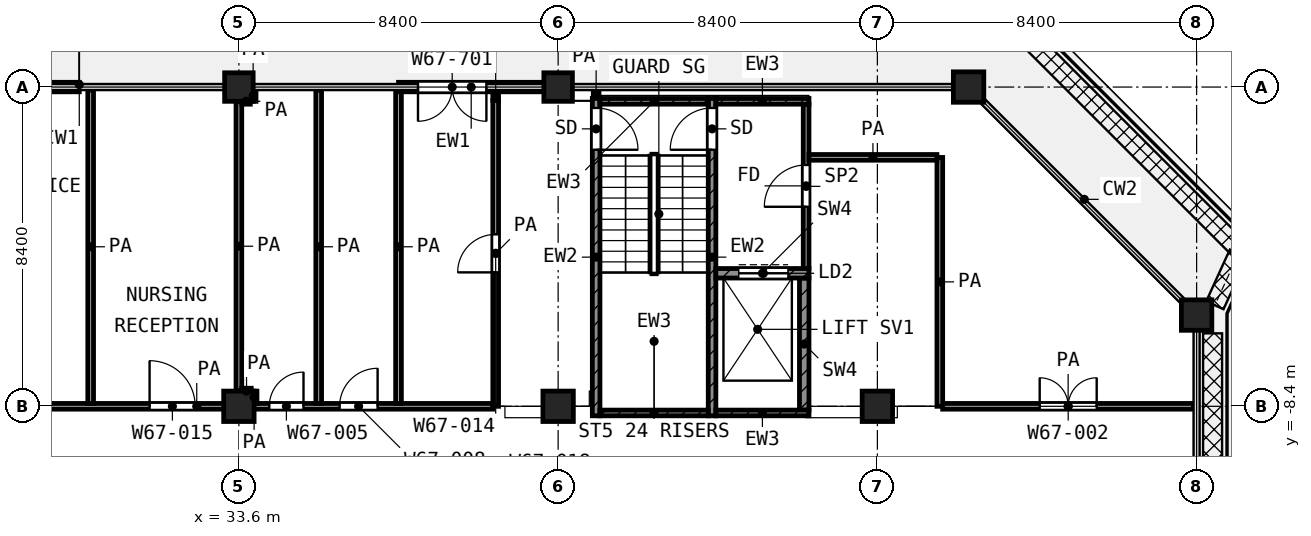
"""IFC4 building model, lengths in metres.
Left out: names, types, materials, properties, quantities, classifications, styles, units other than length and angle.
Written with IfcOpenShell. Run it as: python <this file> out.ifc"""

import sys

from ifc_helpers import new_model, si_unit, direction, frame, frame_2d, origin, origin_2d, place, context, subcontext, project, spatial, rectangle, extrude, element, fill, save


model = new_model("IFC4")
c1 = context("Model", 3, precision=1e-05, world=origin(), true_north=direction((0.0, 1.0)))
c2 = subcontext(c1, "Body", "Model", "MODEL_VIEW")
j1 = project(units=[si_unit("LENGTHUNIT", "METRE"), si_unit("PLANEANGLEUNIT", "RADIAN")], contexts=[c1])
p1 = place(None, origin())
s1 = spatial("IfcSite", under=j1, at=p1, CompositionType="ELEMENT")
p2 = place(p1, origin())
s2 = spatial("IfcBuilding", under=s1, at=p2, CompositionType="ELEMENT")
p3 = place(p2, frame((0.0, 0.0, 311.2)))
s3 = spatial("IfcBuildingStorey", under=s2, at=p3, CompositionType="ELEMENT", Elevation=311.2)
for number, where, z_axis, x_axis in (
    (1, (33.6, 0.0, 0.0), (0.0, 0.0, 1.0), (1.0, 0.0, 0.0)),
    (2, (42.0, 0.0, 0.0), (0.0, 0.0, 1.0), (1.0, 0.0, 0.0)),
):
    element("IfcColumn", number, at=place(p3, frame(where, z_axis=z_axis, x_axis=x_axis)), inside=s3, PredefinedType="COLUMN", context=c2, shape_type="SweptSolid", body=[
        extrude(rectangle(XDim=0.75, YDim=0.75, at=origin_2d()), origin(), (0.0, 0.0, 1.0), 4.2),
    ])
for number, where, z_axis, x_axis in (
    (3, (52.8, 0.0, 0.0), (0.0, 0.0, 1.0), (1.0, 0.0, 0.0)),
    (4, (58.8, -6.0, 0.0), (0.0, 0.0, 1.0), (1.0, 0.0, 0.0)),
    (5, (33.6, -8.4, 0.0), (0.0, 0.0, 1.0), (1.0, 0.0, 0.0)),
    (6, (42.0, -8.4, 0.0), (0.0, 0.0, 1.0), (1.0, 0.0, 0.0)),
    (7, (50.4, -8.4, 0.0), (0.0, 0.0, 1.0), (1.0, 0.0, 0.0)),
):
    element("IfcColumn", number, at=place(p3, frame(where, z_axis=z_axis, x_axis=x_axis)), inside=s3, PredefinedType="COLUMN", context=c2, shape_type="SweptSolid", body=[
        extrude(rectangle(XDim=0.8, YDim=0.8, at=origin_2d()), origin(), (0.0, 0.0, 1.0), 4.2),
    ])
p4 = place(p3, frame((41.625, 0.0, 0.0), z_axis=(0.0, 0.0, 1.0), x_axis=(-1.0, 0.0, 0.0)))
e8 = element("IfcWall", 8, at=p4, inside=s3, PredefinedType="SOLIDWALL", context=c2, shape_type="SweptSolid", body=[
    extrude(rectangle(XDim=3.825, YDim=0.25, at=frame_2d((1.913, 0.0))), origin(), (0.0, 0.0, 1.0), 3.48),
])
p5 = place(p4, frame((1.512, 0.0, 0.0)))
e9 = element("IfcOpeningElement", 9, at=p5, cuts=e8, PredefinedType="OPENING", context=c2, shape_type="SweptSolid", body=[
    extrude(rectangle(XDim=1.8, YDim=2.1, at=frame_2d((0.9, 1.05))), frame((0.0, 0.135, 0.0), z_axis=(0.0, -1.0, 0.0), x_axis=(1.0, 0.0, 0.0)), (0.0, 0.0, 1.0), 0.27),
])
p6 = place(p3, frame((29.4, 0.0, 0.0), z_axis=(0.0, 0.0, 1.0), x_axis=(-1.0, 0.0, 0.0)))
e10 = element("IfcWall", 10, at=p6, inside=s3, PredefinedType="SOLIDWALL", context=c2, shape_type="SweptSolid", body=[
    extrude(rectangle(XDim=3.825, YDim=0.25, at=frame_2d((1.913, 0.0))), origin(), (0.0, 0.0, 1.0), 3.48),
])
p7 = place(p6, frame((1.012, 0.0, 0.0)))
e11 = element("IfcOpeningElement", 11, at=p7, cuts=e10, PredefinedType="OPENING", context=c2, shape_type="SweptSolid", body=[
    extrude(rectangle(XDim=1.8, YDim=2.1, at=frame_2d((0.9, 1.05))), frame((0.0, 0.135, 0.0), z_axis=(0.0, -1.0, 0.0), x_axis=(1.0, 0.0, 0.0)), (0.0, 0.0, 1.0), 0.27),
])
p8 = place(p3, frame((43.0, -8.65, 0.0), z_axis=(0.0, 0.0, 1.0), x_axis=(0.0, 1.0, 0.0)))
e12 = element("IfcWall", 12, at=p8, inside=s3, PredefinedType="SHEAR", context=c2, shape_type="SweptSolid", body=[
    extrude(rectangle(XDim=8.35, YDim=0.2, at=frame_2d((4.175, 0.0))), origin(), (0.0, 0.0, 1.0), 3.6),
])
p9 = place(p8, frame((7.0, 0.0, 0.0)))
e13 = element("IfcOpeningElement", 13, at=p9, cuts=e12, PredefinedType="OPENING", context=c2, shape_type="SweptSolid", body=[
    extrude(rectangle(XDim=1.1, YDim=2.1, at=frame_2d((0.55, 1.05))), frame((0.0, 0.11, 0.0), z_axis=(0.0, -1.0, 0.0), x_axis=(1.0, 0.0, 0.0)), (0.0, 0.0, 1.0), 0.22),
])
p10 = place(p3, frame((46.05, -8.65, 0.0), z_axis=(0.0, 0.0, 1.0), x_axis=(0.0, 1.0, 0.0)))
e14 = element("IfcWall", 14, at=p10, inside=s3, PredefinedType="SHEAR", context=c2, shape_type="SweptSolid", body=[
    extrude(rectangle(XDim=8.35, YDim=0.2, at=frame_2d((4.175, 0.0))), origin(), (0.0, 0.0, 1.0), 3.6),
])
p11 = place(p10, frame((7.0, 0.0, 0.0)))
e15 = element("IfcOpeningElement", 15, at=p11, cuts=e14, PredefinedType="OPENING", context=c2, shape_type="SweptSolid", body=[
    extrude(rectangle(XDim=1.1, YDim=2.1, at=frame_2d((0.55, 1.05))), frame((0.0, 0.11, 0.0), z_axis=(0.0, -1.0, 0.0), x_axis=(1.0, 0.0, 0.0)), (0.0, 0.0, 1.0), 0.22),
])
p12 = place(p3, frame((43.1, -0.375, 0.0), z_axis=(0.0, 0.0, 1.0), x_axis=(1.0, 0.0, 0.0)))
e16 = element("IfcWall", 16, at=p12, inside=s3, PredefinedType="SHEAR", context=c2, shape_type="SweptSolid", body=[
    extrude(rectangle(XDim=2.85, YDim=0.15, at=frame_2d((1.425, 0.0))), origin(), (0.0, 0.0, 1.0), 3.6),
])
p13 = place(p3, frame((46.15, -0.375, 0.0), z_axis=(0.0, 0.0, 1.0), x_axis=(1.0, 0.0, 0.0)))
e17 = element("IfcWall", 17, at=p13, inside=s3, PredefinedType="SHEAR", context=c2, shape_type="SweptSolid", body=[
    extrude(rectangle(XDim=2.45, YDim=0.15, at=frame_2d((1.225, 0.0))), origin(), (0.0, 0.0, 1.0), 3.6),
])
p14 = place(p3, frame((43.1, -8.575, 0.0), z_axis=(0.0, 0.0, 1.0), x_axis=(1.0, 0.0, 0.0)))
e18 = element("IfcWall", 18, at=p14, inside=s3, PredefinedType="SHEAR", context=c2, shape_type="SweptSolid", body=[
    extrude(rectangle(XDim=2.85, YDim=0.15, at=frame_2d((1.425, 0.0))), origin(), (0.0, 0.0, 1.0), 3.6),
])
p15 = place(p3, frame((46.15, -8.575, 0.0), z_axis=(0.0, 0.0, 1.0), x_axis=(1.0, 0.0, 0.0)))
e19 = element("IfcWall", 19, at=p15, inside=s3, PredefinedType="SHEAR", context=c2, shape_type="SweptSolid", body=[
    extrude(rectangle(XDim=2.45, YDim=0.15, at=frame_2d((1.225, 0.0))), origin(), (0.0, 0.0, 1.0), 3.6),
])
p16 = place(p3, frame((46.15, -4.9, 0.0), z_axis=(0.0, 0.0, 1.0), x_axis=(1.0, 0.0, 0.0)))
e20 = element("IfcWall", 20, at=p16, inside=s3, PredefinedType="SHEAR", context=c2, shape_type="SweptSolid", body=[
    extrude(rectangle(XDim=2.45, YDim=0.25, at=frame_2d((1.225, 0.0))), origin(), (0.0, 0.0, 1.0), 3.6),
])
p17 = place(p16, frame((0.6, 0.0, 0.0)))
e21 = element("IfcOpeningElement", 21, at=p17, cuts=e20, PredefinedType="OPENING", context=c2, shape_type="SweptSolid", body=[
    extrude(rectangle(XDim=1.3, YDim=2.1, at=frame_2d((0.65, 1.05))), frame((0.0, 0.135, 0.0), z_axis=(0.0, -1.0, 0.0), x_axis=(1.0, 0.0, 0.0)), (0.0, 0.0, 1.0), 0.27),
])
p18 = place(p3, frame((48.475, -8.5, 0.0), z_axis=(0.0, 0.0, 1.0), x_axis=(0.0, 1.0, 0.0)))
e22 = element("IfcWall", 22, at=p18, inside=s3, PredefinedType="SHEAR", context=c2, shape_type="SweptSolid", body=[
    extrude(rectangle(XDim=3.475, YDim=0.25, at=frame_2d((1.738, 0.0))), origin(), (0.0, 0.0, 1.0), 3.6),
])
p19 = place(p3, frame((48.525, -4.775, 0.0), z_axis=(0.0, 0.0, 1.0), x_axis=(0.0, 1.0, 0.0)))
e23 = element("IfcWall", 23, at=p19, inside=s3, PredefinedType="PARTITIONING", context=c2, shape_type="SweptSolid", body=[
    extrude(rectangle(XDim=4.325, YDim=0.15, at=frame_2d((2.163, 0.0))), origin(), (0.0, 0.0, 1.0), 3.6),
])
p20 = place(p19, frame((1.625, 0.0, 0.0)))
e24 = element("IfcOpeningElement", 24, at=p20, cuts=e23, PredefinedType="OPENING", context=c2, shape_type="SweptSolid", body=[
    extrude(rectangle(XDim=1.1, YDim=2.1, at=frame_2d((0.55, 1.05))), frame((0.0, 0.085, 0.0), z_axis=(0.0, -1.0, 0.0), x_axis=(1.0, 0.0, 0.0)), (0.0, 0.0, 1.0), 0.17),
])
p21 = place(p3, frame((24.7, -8.4, 0.0), z_axis=(0.0, 0.0, 1.0), x_axis=(1.0, 0.0, 0.0)))
e25 = element("IfcWall", 25, at=p21, inside=s3, PredefinedType="PARTITIONING", context=c2, shape_type="SweptSolid", body=[
    extrude(rectangle(XDim=15.582, YDim=0.15, at=frame_2d((7.791, 0.0))), origin(), (0.0, 0.0, 1.0), 3.6),
])
p22 = place(p21, frame((2.25, 0.0, 0.0)))
e26 = element("IfcOpeningElement", 26, at=p22, cuts=e25, PredefinedType="OPENING", context=c2, shape_type="SweptSolid", body=[
    extrude(rectangle(XDim=1.0, YDim=2.1, at=frame_2d((0.5, 1.05))), frame((0.0, 0.085, 0.0), z_axis=(0.0, -1.0, 0.0), x_axis=(1.0, 0.0, 0.0)), (0.0, 0.0, 1.0), 0.17),
])
p23 = place(p21, frame((6.55, 0.0, 0.0)))
e27 = element("IfcOpeningElement", 27, at=p23, cuts=e25, PredefinedType="OPENING", context=c2, shape_type="SweptSolid", body=[
    extrude(rectangle(XDim=1.2, YDim=2.1, at=frame_2d((0.6, 1.05))), frame((0.0, 0.085, 0.0), z_axis=(0.0, -1.0, 0.0), x_axis=(1.0, 0.0, 0.0)), (0.0, 0.0, 1.0), 0.17),
])
p24 = place(p21, frame((9.7, 0.0, 0.0)))
e28 = element("IfcOpeningElement", 28, at=p24, cuts=e25, PredefinedType="OPENING", context=c2, shape_type="SweptSolid", body=[
    extrude(rectangle(XDim=0.9, YDim=2.1, at=frame_2d((0.45, 1.05))), frame((0.0, 0.085, 0.0), z_axis=(0.0, -1.0, 0.0), x_axis=(1.0, 0.0, 0.0)), (0.0, 0.0, 1.0), 0.17),
])
p25 = place(p21, frame((11.55, 0.0, 0.0)))
e29 = element("IfcOpeningElement", 29, at=p25, cuts=e25, PredefinedType="OPENING", context=c2, shape_type="SweptSolid", body=[
    extrude(rectangle(XDim=1.0, YDim=2.1, at=frame_2d((0.5, 1.05))), frame((0.0, 0.085, 0.0), z_axis=(0.0, -1.0, 0.0), x_axis=(1.0, 0.0, 0.0)), (0.0, 0.0, 1.0), 0.17),
])
p26 = place(p3, frame((52.118, -8.4, 0.0), z_axis=(0.0, 0.0, 1.0), x_axis=(1.0, 0.0, 0.0)))
e30 = element("IfcWall", 30, at=p26, inside=s3, PredefinedType="PARTITIONING", context=c2, shape_type="SweptSolid", body=[
    extrude(rectangle(XDim=6.602, YDim=0.15, at=frame_2d((3.301, 0.0))), origin(), (0.0, 0.0, 1.0), 3.6),
])
p27 = place(p26, frame((2.553, 0.0, 0.0)))
e31 = element("IfcOpeningElement", 31, at=p27, cuts=e30, PredefinedType="OPENING", context=c2, shape_type="SweptSolid", body=[
    extrude(rectangle(XDim=1.5, YDim=2.1, at=frame_2d((0.75, 1.05))), frame((0.0, 0.085, 0.0), z_axis=(0.0, -1.0, 0.0), x_axis=(1.0, 0.0, 0.0)), (0.0, 0.0, 1.0), 0.17),
])
p28 = place(p3, frame((33.677, -8.0, 0.0), z_axis=(0.0, 0.0, 1.0), x_axis=(1.0, 0.0, 0.0)))
e32 = element("IfcWall", 32, at=p28, inside=s3, PredefinedType="PARTITIONING", context=c2, shape_type="SweptSolid", body=[
    extrude(rectangle(XDim=0.248, YDim=0.15, at=frame_2d((0.124, 0.0))), origin(), (0.0, 0.0, 1.0), 3.6),
])
p29 = place(p3, frame((48.6, -1.85, 0.0), z_axis=(0.0, 0.0, 1.0), x_axis=(1.0, 0.0, 0.0)))
e33 = element("IfcWall", 33, at=p29, inside=s3, PredefinedType="PARTITIONING", context=c2, shape_type="SweptSolid", body=[
    extrude(rectangle(XDim=3.366, YDim=0.15, at=frame_2d((1.683, 0.0))), origin(), (0.0, 0.0, 1.0), 3.6),
])
p30 = place(p3, frame((33.678, -0.375, 0.0), z_axis=(0.0, 0.0, 1.0), x_axis=(1.0, 0.0, 0.0)))
e34 = element("IfcWall", 34, at=p30, inside=s3, PredefinedType="PARTITIONING", context=c2, shape_type="SweptSolid", body=[
    extrude(rectangle(XDim=0.222, YDim=0.15, at=frame_2d((0.111, 0.0))), origin(), (0.0, 0.0, 1.0), 3.6),
])
p31 = place(p3, frame((29.7, -8.325, 0.0), z_axis=(0.0, 0.0, 1.0), x_axis=(0.0, 1.0, 0.0)))
e35 = element("IfcWall", 35, at=p31, inside=s3, PredefinedType="PARTITIONING", context=c2, shape_type="SweptSolid", body=[
    extrude(rectangle(XDim=8.245, YDim=0.15, at=frame_2d((4.123, 0.0))), origin(), (0.0, 0.0, 1.0), 3.6),
])
p32 = place(p3, frame((33.6, -7.998, 0.0), z_axis=(0.0, 0.0, 1.0), x_axis=(0.0, 1.0, 0.0)))
e36 = element("IfcWall", 36, at=p32, inside=s3, PredefinedType="PARTITIONING", context=c2, shape_type="SweptSolid", body=[
    extrude(rectangle(XDim=7.62, YDim=0.15, at=frame_2d((3.81, 0.0))), origin(), (0.0, 0.0, 1.0), 3.6),
])
p33 = place(p3, frame((33.975, -0.375, 0.0), z_axis=(0.0, 0.0, 1.0), x_axis=(0.0, 1.0, 0.0)))
e37 = element("IfcWall", 37, at=p33, inside=s3, PredefinedType="PARTITIONING", context=c2, shape_type="SweptSolid", body=[
    extrude(rectangle(XDim=0.295, YDim=0.15, at=frame_2d((0.147, 0.0))), origin(), (0.0, 0.0, 1.0), 3.6),
])
p34 = place(p3, frame((34.0, -8.325, 0.0), z_axis=(0.0, 0.0, 1.0), x_axis=(0.0, 1.0, 0.0)))
e38 = element("IfcWall", 38, at=p34, inside=s3, PredefinedType="PARTITIONING", context=c2, shape_type="SweptSolid", body=[
    extrude(rectangle(XDim=0.325, YDim=0.15, at=frame_2d((0.163, 0.0))), origin(), (0.0, 0.0, 1.0), 3.6),
])
for number, where, z_axis, x_axis in (
    (39, (35.7, -8.325, 0.0), (0.0, 0.0, 1.0), (0.0, 1.0, 0.0)),
    (40, (37.8, -8.325, 0.0), (0.0, 0.0, 1.0), (0.0, 1.0, 0.0)),
):
    element("IfcWall", number, at=place(p3, frame(where, z_axis=z_axis, x_axis=x_axis)), inside=s3, PredefinedType="PARTITIONING", context=c2, shape_type="SweptSolid", body=[
        extrude(rectangle(XDim=8.245, YDim=0.15, at=frame_2d((4.123, 0.0))), origin(), (0.0, 0.0, 1.0), 3.6),
    ])
p35 = place(p3, frame((40.357, -8.4, 0.0), z_axis=(0.0, 0.0, 1.0), x_axis=(0.0, 1.0, 0.0)))
e41 = element("IfcWall", 41, at=p35, inside=s3, PredefinedType="PARTITIONING", context=c2, shape_type="SweptSolid", body=[
    extrude(rectangle(XDim=8.048, YDim=0.15, at=frame_2d((4.024, 0.0))), origin(), (0.0, 0.0, 1.0), 3.6),
])
p36 = place(p35, frame((3.524, 0.0, 0.0)))
e42 = element("IfcOpeningElement", 42, at=p36, cuts=e41, PredefinedType="OPENING", context=c2, shape_type="SweptSolid", body=[
    extrude(rectangle(XDim=1.0, YDim=2.1, at=frame_2d((0.5, 1.05))), frame((0.0, 0.085, 0.0), z_axis=(0.0, -1.0, 0.0), x_axis=(1.0, 0.0, 0.0)), (0.0, 0.0, 1.0), 0.17),
])
p37 = place(p3, frame((40.357, -0.35, 0.0), z_axis=(0.0, 0.0, 1.0), x_axis=(0.0, 1.0, 0.0)))
e43 = element("IfcWall", 43, at=p37, inside=s3, PredefinedType="PARTITIONING", context=c2, shape_type="SweptSolid", body=[
    extrude(rectangle(XDim=0.27, YDim=0.15, at=frame_2d((0.135, 0.0))), origin(), (0.0, 0.0, 1.0), 3.6),
])
p38 = place(p3, frame((43.0, -0.27, 0.0), z_axis=(0.0, 0.0, 1.0), x_axis=(0.0, 1.0, 0.0)))
e44 = element("IfcWall", 44, at=p38, inside=s3, PredefinedType="PARTITIONING", context=c2, shape_type="SweptSolid", body=[
    extrude(rectangle(XDim=0.19, YDim=0.15, at=frame_2d((0.095, 0.0))), origin(), (0.0, 0.0, 1.0), 3.6),
])
p39 = place(p3, frame((52.043, -8.4, 0.0), z_axis=(0.0, 0.0, 1.0), x_axis=(0.0, 1.0, 0.0)))
e45 = element("IfcWall", 45, at=p39, inside=s3, PredefinedType="PARTITIONING", context=c2, shape_type="SweptSolid", body=[
    extrude(rectangle(XDim=6.548, YDim=0.15, at=frame_2d((3.274, 0.0))), origin(), (0.0, 0.0, 1.0), 3.6),
])
p40 = place(p5, origin())
e46 = element("IfcDoor", 46, at=p40, inside=s3, OperationType="DOUBLE_DOOR_SINGLE_SWING", PredefinedType="DOOR", context=c2, shape_type="SweptSolid", body=[
    extrude(rectangle(XDim=1.8, YDim=2.1, at=frame_2d((0.9, 1.05))), frame((0.0, 0.025, 0.0), z_axis=(0.0, -1.0, 0.0), x_axis=(1.0, 0.0, 0.0)), (0.0, 0.0, 1.0), 0.05),
])
fill(e9, e46)
p41 = place(p9, frame((1.1, 0.0, 0.0), z_axis=(0.0, 0.0, 1.0), x_axis=(-1.0, 0.0, 0.0)))
e47 = element("IfcDoor", 47, at=p41, inside=s3, OperationType="SINGLE_SWING_LEFT", PredefinedType="DOOR", context=c2, shape_type="SweptSolid", body=[
    extrude(rectangle(XDim=1.1, YDim=2.1, at=frame_2d((0.55, 1.05))), frame((0.0, 0.025, 0.0), z_axis=(0.0, -1.0, 0.0), x_axis=(1.0, 0.0, 0.0)), (0.0, 0.0, 1.0), 0.05),
])
fill(e13, e47)
p42 = place(p11, origin())
e48 = element("IfcDoor", 48, at=p42, inside=s3, OperationType="SINGLE_SWING_LEFT", PredefinedType="DOOR", context=c2, shape_type="SweptSolid", body=[
    extrude(rectangle(XDim=1.1, YDim=2.1, at=frame_2d((0.55, 1.05))), frame((0.0, 0.025, 0.0), z_axis=(0.0, -1.0, 0.0), x_axis=(1.0, 0.0, 0.0)), (0.0, 0.0, 1.0), 0.05),
])
fill(e15, e48)
p43 = place(p17, origin())
e49 = element("IfcDoor", 49, at=p43, inside=s3, OperationType="DOUBLE_DOOR_SLIDING", PredefinedType="DOOR", context=c2, shape_type="SweptSolid", body=[
    extrude(rectangle(XDim=1.3, YDim=2.1, at=frame_2d((0.65, 1.05))), frame((0.0, 0.025, 0.0), z_axis=(0.0, -1.0, 0.0), x_axis=(1.0, 0.0, 0.0)), (0.0, 0.0, 1.0), 0.05),
])
fill(e21, e49)
p44 = place(p20, origin())
e50 = element("IfcDoor", 50, at=p44, inside=s3, OperationType="SINGLE_SWING_LEFT", PredefinedType="DOOR", context=c2, shape_type="SweptSolid", body=[
    extrude(rectangle(XDim=1.1, YDim=2.1, at=frame_2d((0.55, 1.05))), frame((0.0, 0.025, 0.0), z_axis=(0.0, -1.0, 0.0), x_axis=(1.0, 0.0, 0.0)), (0.0, 0.0, 1.0), 0.05),
])
fill(e24, e50)
p45 = place(p23, origin())
e51 = element("IfcDoor", 51, at=p45, inside=s3, OperationType="SINGLE_SWING_LEFT", PredefinedType="DOOR", context=c2, shape_type="SweptSolid", body=[
    extrude(rectangle(XDim=1.2, YDim=2.1, at=frame_2d((0.6, 1.05))), frame((0.0, 0.025, 0.0), z_axis=(0.0, -1.0, 0.0), x_axis=(1.0, 0.0, 0.0)), (0.0, 0.0, 1.0), 0.05),
])
fill(e27, e51)
p46 = place(p27, origin())
e52 = element("IfcDoor", 52, at=p46, inside=s3, OperationType="DOUBLE_DOOR_SINGLE_SWING", PredefinedType="DOOR", context=c2, shape_type="SweptSolid", body=[
    extrude(rectangle(XDim=1.5, YDim=2.1, at=frame_2d((0.75, 1.05))), frame((0.0, 0.025, 0.0), z_axis=(0.0, -1.0, 0.0), x_axis=(1.0, 0.0, 0.0)), (0.0, 0.0, 1.0), 0.05),
])
fill(e31, e52)
p47 = place(p24, origin())
e53 = element("IfcDoor", 53, at=p47, inside=s3, OperationType="SINGLE_SWING_RIGHT", PredefinedType="DOOR", context=c2, shape_type="SweptSolid", body=[
    extrude(rectangle(XDim=0.9, YDim=2.1, at=frame_2d((0.45, 1.05))), frame((0.0, 0.025, 0.0), z_axis=(0.0, -1.0, 0.0), x_axis=(1.0, 0.0, 0.0)), (0.0, 0.0, 1.0), 0.05),
])
fill(e28, e53)
p48 = place(p25, origin())
e54 = element("IfcDoor", 54, at=p48, inside=s3, OperationType="SINGLE_SWING_RIGHT", PredefinedType="DOOR", context=c2, shape_type="SweptSolid", body=[
    extrude(rectangle(XDim=1.0, YDim=2.1, at=frame_2d((0.5, 1.05))), frame((0.0, 0.025, 0.0), z_axis=(0.0, -1.0, 0.0), x_axis=(1.0, 0.0, 0.0)), (0.0, 0.0, 1.0), 0.05),
])
fill(e29, e54)
p49 = place(p36, origin())
e55 = element("IfcDoor", 55, at=p49, inside=s3, OperationType="SINGLE_SWING_LEFT", PredefinedType="DOOR", context=c2, shape_type="SweptSolid", body=[
    extrude(rectangle(XDim=1.0, YDim=2.1, at=frame_2d((0.5, 1.05))), frame((0.0, 0.025, 0.0), z_axis=(0.0, -1.0, 0.0), x_axis=(1.0, 0.0, 0.0)), (0.0, 0.0, 1.0), 0.05),
])
fill(e42, e55)
save(model, sys.argv[1])
